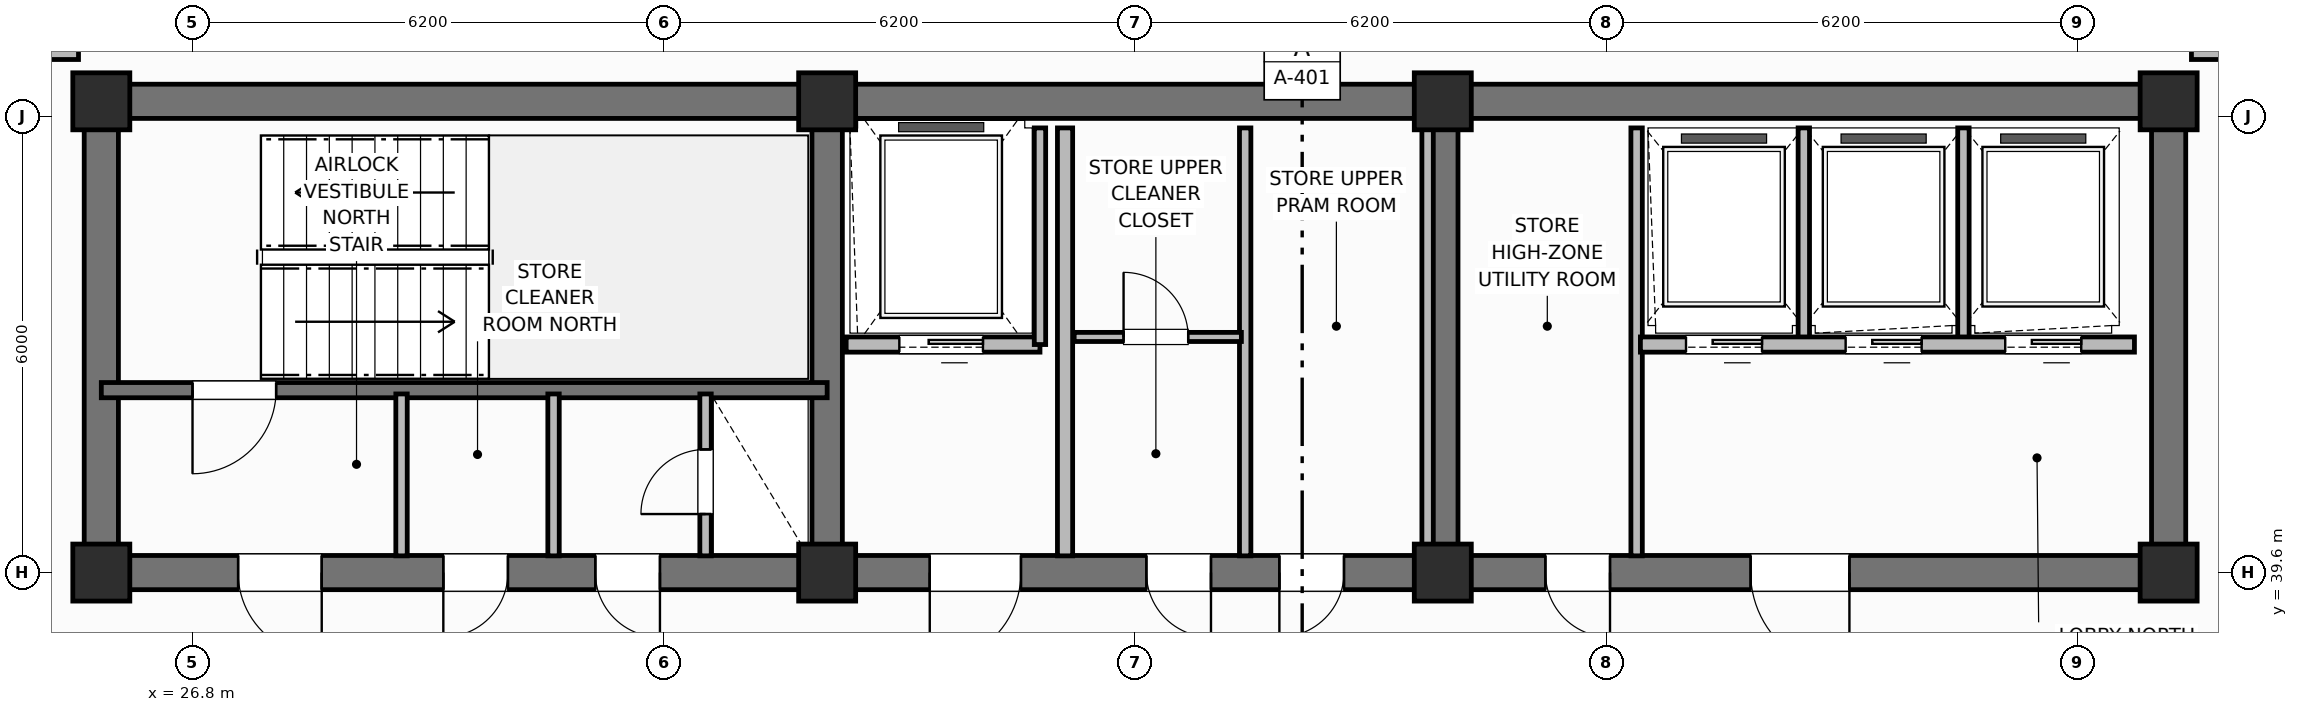
"""IFC4 building model, lengths in metres.
Left out: names, types, materials, properties, quantities, classifications, styles, units other than length and angle.
Written with IfcOpenShell. Run it as: python <this file> out.ifc"""

import sys

from ifc_helpers import new_model, si_unit, direction, frame, frame_2d, origin, origin_2d, place, context, subcontext, project, spatial, rectangle, extrude, element, fill, save


model = new_model("IFC4")
c1 = context("Model", 3, precision=1e-05, world=origin(), true_north=direction((0.0, 1.0)))
c2 = subcontext(c1, "Body", "Model", "MODEL_VIEW")
j1 = project(units=[si_unit("LENGTHUNIT", "METRE"), si_unit("PLANEANGLEUNIT", "RADIAN")], contexts=[c1])
p1 = place(None, origin())
s1 = spatial("IfcSite", under=j1, at=p1, CompositionType="ELEMENT")
p2 = place(p1, origin())
s2 = spatial("IfcBuilding", under=s1, at=p2, CompositionType="ELEMENT")
p3 = place(p2, frame((0.0, 0.0, 267.6)))
s3 = spatial("IfcBuildingStorey", under=s2, at=p3, CompositionType="ELEMENT", Elevation=267.6)
p4 = place(p3, frame((25.6, 45.8, 0.0), z_axis=(0.0, 0.0, 1.0), x_axis=(1.0, 0.0, 0.0)))
e1 = element("IfcWall", 1, at=p4, inside=s3, PredefinedType="SHEAR", context=c2, shape_type="SweptSolid", body=[
    extrude(rectangle(XDim=27.2, YDim=0.45, at=frame_2d((13.6, 0.0))), origin(), (0.0, 0.0, 1.0), 3.7),
])
for number, where, z_axis, x_axis in (
    (2, (25.6, 39.825, 0.0), (0.0, 0.0, 1.0), (0.0, 1.0, 0.0)),
    (3, (52.8, 39.825, 0.0), (0.0, 0.0, 1.0), (0.0, 1.0, 0.0)),
):
    element("IfcWall", number, at=place(p3, frame(where, z_axis=z_axis, x_axis=x_axis)), inside=s3, PredefinedType="SHEAR", context=c2, shape_type="SweptSolid", body=[
        extrude(rectangle(XDim=5.75, YDim=0.45, at=frame_2d((2.875, 0.0))), origin(), (0.0, 0.0, 1.0), 3.7),
    ])
p5 = place(p3, frame((52.8, 39.6, 0.0), z_axis=(0.0, 0.0, 1.0), x_axis=(-1.0, 0.0, 0.0)))
e4 = element("IfcWall", 4, at=p5, inside=s3, PredefinedType="SHEAR", context=c2, shape_type="SweptSolid", body=[
    extrude(rectangle(XDim=27.2, YDim=0.45, at=frame_2d((13.6, 0.0))), origin(), (0.0, 0.0, 1.0), 3.7),
])
p6 = place(p5, frame((24.3, 0.0, 0.0)))
e5 = element("IfcOpeningElement", 5, at=p6, cuts=e4, PredefinedType="OPENING", context=c2, shape_type="SweptSolid", body=[
    extrude(rectangle(XDim=1.1, YDim=2.15, at=frame_2d((0.55, 1.075))), frame((0.0, 0.235, 0.0), z_axis=(0.0, -1.0, 0.0), x_axis=(1.0, 0.0, 0.0)), (0.0, 0.0, 1.0), 0.47),
])
p7 = place(p5, frame((21.85, 0.0, 0.0)))
e6 = element("IfcOpeningElement", 6, at=p7, cuts=e4, PredefinedType="OPENING", context=c2, shape_type="SweptSolid", body=[
    extrude(rectangle(XDim=0.85, YDim=2.1, at=frame_2d((0.425, 1.05))), frame((0.0, 0.235, 0.0), z_axis=(0.0, -1.0, 0.0), x_axis=(1.0, 0.0, 0.0)), (0.0, 0.0, 1.0), 0.47),
])
p8 = place(p5, frame((19.85, 0.0, 0.0)))
e7 = element("IfcOpeningElement", 7, at=p8, cuts=e4, PredefinedType="OPENING", context=c2, shape_type="SweptSolid", body=[
    extrude(rectangle(XDim=0.85, YDim=2.1, at=frame_2d((0.425, 1.05))), frame((0.0, 0.235, 0.0), z_axis=(0.0, -1.0, 0.0), x_axis=(1.0, 0.0, 0.0)), (0.0, 0.0, 1.0), 0.47),
])
p9 = place(p5, frame((15.1, 0.0, 0.0)))
e8 = element("IfcOpeningElement", 8, at=p9, cuts=e4, PredefinedType="OPENING", context=c2, shape_type="SweptSolid", body=[
    extrude(rectangle(XDim=1.2, YDim=2.15, at=frame_2d((0.6, 1.075))), frame((0.0, 0.235, 0.0), z_axis=(0.0, -1.0, 0.0), x_axis=(1.0, 0.0, 0.0)), (0.0, 0.0, 1.0), 0.47),
])
p10 = place(p5, frame((12.6, 0.0, 0.0)))
e9 = element("IfcOpeningElement", 9, at=p10, cuts=e4, PredefinedType="OPENING", context=c2, shape_type="SweptSolid", body=[
    extrude(rectangle(XDim=0.85, YDim=2.1, at=frame_2d((0.425, 1.05))), frame((0.0, 0.235, 0.0), z_axis=(0.0, -1.0, 0.0), x_axis=(1.0, 0.0, 0.0)), (0.0, 0.0, 1.0), 0.47),
])
p11 = place(p5, frame((10.85, 0.0, 0.0)))
e10 = element("IfcOpeningElement", 10, at=p11, cuts=e4, PredefinedType="OPENING", context=c2, shape_type="SweptSolid", body=[
    extrude(rectangle(XDim=0.85, YDim=2.1, at=frame_2d((0.425, 1.05))), frame((0.0, 0.235, 0.0), z_axis=(0.0, -1.0, 0.0), x_axis=(1.0, 0.0, 0.0)), (0.0, 0.0, 1.0), 0.47),
])
p12 = place(p5, frame((7.35, 0.0, 0.0)))
e11 = element("IfcOpeningElement", 11, at=p12, cuts=e4, PredefinedType="OPENING", context=c2, shape_type="SweptSolid", body=[
    extrude(rectangle(XDim=0.85, YDim=2.1, at=frame_2d((0.425, 1.05))), frame((0.0, 0.235, 0.0), z_axis=(0.0, -1.0, 0.0), x_axis=(1.0, 0.0, 0.0)), (0.0, 0.0, 1.0), 0.47),
])
p13 = place(p5, frame((4.2, 0.0, 0.0)))
e12 = element("IfcOpeningElement", 12, at=p13, cuts=e4, PredefinedType="OPENING", context=c2, shape_type="SweptSolid", body=[
    extrude(rectangle(XDim=1.3, YDim=2.2, at=frame_2d((0.65, 1.1))), frame((0.0, 0.235, 0.0), z_axis=(0.0, -1.0, 0.0), x_axis=(1.0, 0.0, 0.0)), (0.0, 0.0, 1.0), 0.47),
])
for number, where, z_axis, x_axis in (
    (13, (35.15, 39.825, 0.0), (0.0, 0.0, 1.0), (0.0, 1.0, 0.0)),
    (14, (43.25, 39.825, 0.0), (0.0, 0.0, 1.0), (0.0, 1.0, 0.0)),
):
    element("IfcWall", number, at=place(p3, frame(where, z_axis=z_axis, x_axis=x_axis)), inside=s3, PredefinedType="SHEAR", context=c2, shape_type="SweptSolid", body=[
        extrude(rectangle(XDim=5.75, YDim=0.4, at=frame_2d((2.875, 0.0))), origin(), (0.0, 0.0, 1.0), 3.7),
    ])
for number, where, z_axis, x_axis in (
    (15, (25.6, 39.6, 0.0), (0.0, 0.0, 1.0), (1.0, 0.0, 0.0)),
    (16, (25.6, 45.8, 0.0), (0.0, 0.0, 1.0), (1.0, 0.0, 0.0)),
    (17, (35.15, 39.6, 0.0), (0.0, 0.0, 1.0), (1.0, 0.0, 0.0)),
    (18, (35.15, 45.8, 0.0), (0.0, 0.0, 1.0), (1.0, 0.0, 0.0)),
    (19, (43.25, 39.6, 0.0), (0.0, 0.0, 1.0), (1.0, 0.0, 0.0)),
    (20, (43.25, 45.8, 0.0), (0.0, 0.0, 1.0), (1.0, 0.0, 0.0)),
    (21, (52.8, 39.6, 0.0), (0.0, 0.0, 1.0), (1.0, 0.0, 0.0)),
    (22, (52.8, 45.8, 0.0), (0.0, 0.0, 1.0), (1.0, 0.0, 0.0)),
):
    element("IfcColumn", number, at=place(p3, frame(where, z_axis=z_axis, x_axis=x_axis)), inside=s3, PredefinedType="COLUMN", context=c2, shape_type="SweptSolid", body=[
        extrude(rectangle(XDim=0.75, YDim=0.75, at=origin_2d()), origin(), (0.0, 0.0, 1.0), 3.7),
    ])
p14 = place(p3, frame((35.15, 42.0, 0.0), z_axis=(0.0, 0.0, 1.0), x_axis=(-1.0, 0.0, 0.0)))
e23 = element("IfcWall", 23, at=p14, inside=s3, PredefinedType="SHEAR", context=c2, shape_type="SweptSolid", body=[
    extrude(rectangle(XDim=9.55, YDim=0.2, at=frame_2d((4.775, 0.0))), origin(), (0.0, 0.0, 1.0), 3.7),
])
p15 = place(p14, frame((7.25, 0.0, 0.0)))
e24 = element("IfcOpeningElement", 24, at=p15, cuts=e23, PredefinedType="OPENING", context=c2, shape_type="SweptSolid", body=[
    extrude(rectangle(XDim=1.1, YDim=2.15, at=frame_2d((0.55, 1.075))), frame((0.0, 0.11, 0.0), z_axis=(0.0, -1.0, 0.0), x_axis=(1.0, 0.0, 0.0)), (0.0, 0.0, 1.0), 0.22),
])
p16 = place(p3, frame((33.55, 39.82, 0.0), z_axis=(0.0, 0.0, 1.0), x_axis=(0.0, 1.0, 0.0)))
e25 = element("IfcWall", 25, at=p16, inside=s3, PredefinedType="PARTITIONING", context=c2, shape_type="SweptSolid", body=[
    extrude(rectangle(XDim=2.13, YDim=0.15, at=frame_2d((1.065, 0.0))), origin(), (0.0, 0.0, 1.0), 2.56),
])
p17 = place(p16, frame((0.55, 0.0, 0.0)))
e26 = element("IfcOpeningElement", 26, at=p17, cuts=e25, PredefinedType="OPENING", context=c2, shape_type="SweptSolid", body=[
    extrude(rectangle(XDim=0.85, YDim=2.05, at=frame_2d((0.425, 1.025))), frame((0.0, 0.085, 0.0), z_axis=(0.0, -1.0, 0.0), x_axis=(1.0, 0.0, 0.0)), (0.0, 0.0, 1.0), 0.17),
])
for number, where, z_axis, x_axis in (
    (27, (29.55, 39.82, 0.0), (0.0, 0.0, 1.0), (0.0, 1.0, 0.0)),
    (28, (31.55, 39.82, 0.0), (0.0, 0.0, 1.0), (0.0, 1.0, 0.0)),
):
    element("IfcWall", number, at=place(p3, frame(where, z_axis=z_axis, x_axis=x_axis)), inside=s3, PredefinedType="PARTITIONING", context=c2, shape_type="SweptSolid", body=[
        extrude(rectangle(XDim=2.13, YDim=0.15, at=frame_2d((1.065, 0.0))), origin(), (0.0, 0.0, 1.0), 2.56),
    ])
p18 = place(p3, frame((37.95, 42.6, 0.0), z_axis=(0.0, 0.0, 1.0), x_axis=(-1.0, 0.0, 0.0)))
e29 = element("IfcWall", 29, at=p18, inside=s3, PredefinedType="PARTITIONING", context=c2, shape_type="SweptSolid", body=[
    extrude(rectangle(XDim=2.55, YDim=0.2, at=frame_2d((1.275, 0.0))), origin(), (0.0, 0.0, 1.0), 2.33),
])
p19 = place(p18, frame((0.75, 0.0, 0.0)))
e30 = element("IfcOpeningElement", 30, at=p19, cuts=e29, PredefinedType="OPENING", context=c2, shape_type="SweptSolid", body=[
    extrude(rectangle(XDim=1.1, YDim=2.15, at=frame_2d((0.55, 1.075))), frame((0.0, 0.11, 0.0), z_axis=(0.0, -1.0, 0.0), x_axis=(1.0, 0.0, 0.0)), (0.0, 0.0, 1.0), 0.22),
])
p20 = place(p3, frame((37.95, 42.6, 0.0), z_axis=(0.0, 0.0, 1.0), x_axis=(0.0, 1.0, 0.0)))
e31 = element("IfcWall", 31, at=p20, inside=s3, PredefinedType="PARTITIONING", context=c2, shape_type="SweptSolid", body=[
    extrude(rectangle(XDim=2.85, YDim=0.15, at=frame_2d((1.425, 0.0))), origin(), (0.0, 0.0, 1.0), 2.56),
])
p21 = place(p3, frame((38.28, 39.82, 0.0), z_axis=(0.0, 0.0, 1.0), x_axis=(0.0, 1.0, 0.0)))
e32 = element("IfcWall", 32, at=p21, inside=s3, PredefinedType="PARTITIONING", context=c2, shape_type="SweptSolid", body=[
    extrude(rectangle(XDim=5.63, YDim=0.2, at=frame_2d((2.815, 0.0))), origin(), (0.0, 0.0, 1.0), 2.56),
])
for number, where, z_axis, x_axis in (
    (33, (43.05, 39.82, 0.0), (0.0, 0.0, 1.0), (0.0, 1.0, 0.0)),
    (34, (40.65, 39.82, 0.0), (0.0, 0.0, 1.0), (0.0, 1.0, 0.0)),
):
    element("IfcWall", number, at=place(p3, frame(where, z_axis=z_axis, x_axis=x_axis)), inside=s3, PredefinedType="PARTITIONING", context=c2, shape_type="SweptSolid", body=[
        extrude(rectangle(XDim=5.63, YDim=0.15, at=frame_2d((2.815, 0.0))), origin(), (0.0, 0.0, 1.0), 2.56),
    ])
p22 = place(p3, frame((38.4, 42.7, 0.0), z_axis=(0.0, 0.0, 1.0), x_axis=(1.0, 0.0, 0.0)))
e35 = element("IfcWall", 35, at=p22, inside=s3, PredefinedType="PARTITIONING", context=c2, shape_type="SweptSolid", body=[
    extrude(rectangle(XDim=2.2, YDim=0.12, at=frame_2d((1.1, 0.0))), origin(), (0.0, 0.0, 1.0), 2.33),
])
p23 = place(p22, frame((0.65, 0.0, 0.0)))
e36 = element("IfcOpeningElement", 36, at=p23, cuts=e35, PredefinedType="OPENING", context=c2, shape_type="SweptSolid", body=[
    extrude(rectangle(XDim=0.85, YDim=2.1, at=frame_2d((0.425, 1.05))), frame((0.0, 0.07, 0.0), z_axis=(0.0, -1.0, 0.0), x_axis=(1.0, 0.0, 0.0)), (0.0, 0.0, 1.0), 0.14),
])
p24 = place(p3, frame((45.8, 39.82, 0.0), z_axis=(0.0, 0.0, 1.0), x_axis=(0.0, 1.0, 0.0)))
e37 = element("IfcWall", 37, at=p24, inside=s3, PredefinedType="PARTITIONING", context=c2, shape_type="SweptSolid", body=[
    extrude(rectangle(XDim=5.63, YDim=0.15, at=frame_2d((2.815, 0.0))), origin(), (0.0, 0.0, 1.0), 2.56),
])
for number, where, z_axis, x_axis in (
    (38, (48.0, 42.65, 0.0), (0.0, 0.0, 1.0), (0.0, 1.0, 0.0)),
    (39, (50.1, 42.65, 0.0), (0.0, 0.0, 1.0), (0.0, 1.0, 0.0)),
):
    element("IfcWall", number, at=place(p3, frame(where, z_axis=z_axis, x_axis=x_axis)), inside=s3, PredefinedType="PARTITIONING", context=c2, shape_type="SweptSolid", body=[
        extrude(rectangle(XDim=2.8, YDim=0.15, at=frame_2d((1.4, 0.0))), origin(), (0.0, 0.0, 1.0), 2.56),
    ])
p25 = place(p3, frame((52.35, 42.6, 0.0), z_axis=(0.0, 0.0, 1.0), x_axis=(-1.0, 0.0, 0.0)))
e40 = element("IfcWall", 40, at=p25, inside=s3, PredefinedType="PARTITIONING", context=c2, shape_type="SweptSolid", body=[
    extrude(rectangle(XDim=6.5, YDim=0.2, at=frame_2d((3.25, 0.0))), origin(), (0.0, 0.0, 1.0), 2.56),
])
p26 = place(p25, frame((4.9, 0.0, 0.0)))
e41 = element("IfcOpeningElement", 41, at=p26, cuts=e40, PredefinedType="OPENING", context=c2, shape_type="SweptSolid", body=[
    extrude(rectangle(XDim=1.0, YDim=2.15, at=frame_2d((0.5, 1.075))), frame((0.0, 0.11, 0.0), z_axis=(0.0, -1.0, 0.0), x_axis=(1.0, 0.0, 0.0)), (0.0, 0.0, 1.0), 0.22),
])
p27 = place(p25, frame((2.8, 0.0, 0.0)))
e42 = element("IfcOpeningElement", 42, at=p27, cuts=e40, PredefinedType="OPENING", context=c2, shape_type="SweptSolid", body=[
    extrude(rectangle(XDim=1.0, YDim=2.15, at=frame_2d((0.5, 1.075))), frame((0.0, 0.11, 0.0), z_axis=(0.0, -1.0, 0.0), x_axis=(1.0, 0.0, 0.0)), (0.0, 0.0, 1.0), 0.22),
])
p28 = place(p25, frame((0.7, 0.0, 0.0)))
e43 = element("IfcOpeningElement", 43, at=p28, cuts=e40, PredefinedType="OPENING", context=c2, shape_type="SweptSolid", body=[
    extrude(rectangle(XDim=1.0, YDim=2.15, at=frame_2d((0.5, 1.075))), frame((0.0, 0.11, 0.0), z_axis=(0.0, -1.0, 0.0), x_axis=(1.0, 0.0, 0.0)), (0.0, 0.0, 1.0), 0.22),
])
p29 = place(p3, frame((21.546, 46.45, 0.0), z_axis=(0.0, 0.0, 1.0), x_axis=(1.0, 0.0, 0.0)))
e44 = element("IfcWall", 44, at=p29, inside=s3, PredefinedType="PARTITIONING", context=c2, shape_type="SweptSolid", body=[
    extrude(rectangle(XDim=3.754, YDim=0.2, at=frame_2d((1.877, 0.0))), origin(), (0.0, 0.0, 1.0), 2.56),
])
p30 = place(p3, frame((53.1, 46.45, 0.0), z_axis=(0.0, 0.0, 1.0), x_axis=(1.0, 0.0, 0.0)))
e45 = element("IfcWall", 45, at=p30, inside=s3, PredefinedType="PARTITIONING", context=c2, shape_type="SweptSolid", body=[
    extrude(rectangle(XDim=3.754, YDim=0.2, at=frame_2d((1.877, 0.0))), origin(), (0.0, 0.0, 1.0), 2.56),
])
p31 = place(p15, origin())
e46 = element("IfcDoor", 46, at=p31, inside=s3, OperationType="SINGLE_SWING_RIGHT", PredefinedType="DOOR", context=c2, shape_type="SweptSolid", body=[
    extrude(rectangle(XDim=1.1, YDim=2.15, at=frame_2d((0.55, 1.075))), frame((0.0, 0.025, 0.0), z_axis=(0.0, -1.0, 0.0), x_axis=(1.0, 0.0, 0.0)), (0.0, 0.0, 1.0), 0.05),
])
fill(e24, e46)
p32 = place(p17, origin())
e47 = element("IfcDoor", 47, at=p32, inside=s3, OperationType="SINGLE_SWING_LEFT", PredefinedType="TRAPDOOR", context=c2, shape_type="SweptSolid", body=[
    extrude(rectangle(XDim=0.85, YDim=2.05, at=frame_2d((0.425, 1.025))), frame((0.0, 0.025, 0.0), z_axis=(0.0, -1.0, 0.0), x_axis=(1.0, 0.0, 0.0)), (0.0, 0.0, 1.0), 0.05),
])
fill(e26, e47)
p33 = place(p19, origin())
e48 = element("IfcDoor", 48, at=p33, inside=s3, OperationType="SLIDING_TO_LEFT", PredefinedType="DOOR", context=c2, shape_type="SweptSolid", body=[
    extrude(rectangle(XDim=1.1, YDim=2.15, at=frame_2d((0.55, 1.075))), frame((0.0, 0.025, 0.0), z_axis=(0.0, -1.0, 0.0), x_axis=(1.0, 0.0, 0.0)), (0.0, 0.0, 1.0), 0.05),
])
fill(e30, e48)
p34 = place(p23, origin())
e49 = element("IfcDoor", 49, at=p34, inside=s3, OperationType="SINGLE_SWING_LEFT", PredefinedType="DOOR", context=c2, shape_type="SweptSolid", body=[
    extrude(rectangle(XDim=0.85, YDim=2.1, at=frame_2d((0.425, 1.05))), frame((0.0, 0.025, 0.0), z_axis=(0.0, -1.0, 0.0), x_axis=(1.0, 0.0, 0.0)), (0.0, 0.0, 1.0), 0.05),
])
fill(e36, e49)
p35 = place(p26, origin())
e50 = element("IfcDoor", 50, at=p35, inside=s3, OperationType="SLIDING_TO_LEFT", PredefinedType="DOOR", context=c2, shape_type="SweptSolid", body=[
    extrude(rectangle(XDim=1.0, YDim=2.15, at=frame_2d((0.5, 1.075))), frame((0.0, 0.025, 0.0), z_axis=(0.0, -1.0, 0.0), x_axis=(1.0, 0.0, 0.0)), (0.0, 0.0, 1.0), 0.05),
])
fill(e41, e50)
p36 = place(p27, origin())
e51 = element("IfcDoor", 51, at=p36, inside=s3, OperationType="SLIDING_TO_LEFT", PredefinedType="DOOR", context=c2, shape_type="SweptSolid", body=[
    extrude(rectangle(XDim=1.0, YDim=2.15, at=frame_2d((0.5, 1.075))), frame((0.0, 0.025, 0.0), z_axis=(0.0, -1.0, 0.0), x_axis=(1.0, 0.0, 0.0)), (0.0, 0.0, 1.0), 0.05),
])
fill(e42, e51)
p37 = place(p28, origin())
e52 = element("IfcDoor", 52, at=p37, inside=s3, OperationType="SLIDING_TO_LEFT", PredefinedType="DOOR", context=c2, shape_type="SweptSolid", body=[
    extrude(rectangle(XDim=1.0, YDim=2.15, at=frame_2d((0.5, 1.075))), frame((0.0, 0.025, 0.0), z_axis=(0.0, -1.0, 0.0), x_axis=(1.0, 0.0, 0.0)), (0.0, 0.0, 1.0), 0.05),
])
fill(e43, e52)
p38 = place(p6, origin())
e53 = element("IfcDoor", 53, at=p38, inside=s3, OperationType="SINGLE_SWING_LEFT", PredefinedType="DOOR", context=c2, shape_type="SweptSolid", body=[
    extrude(rectangle(XDim=1.1, YDim=2.15, at=frame_2d((0.55, 1.075))), frame((0.0, 0.025, 0.0), z_axis=(0.0, -1.0, 0.0), x_axis=(1.0, 0.0, 0.0)), (0.0, 0.0, 1.0), 0.05),
])
fill(e5, e53)
p39 = place(p7, origin())
e54 = element("IfcDoor", 54, at=p39, inside=s3, OperationType="SINGLE_SWING_RIGHT", PredefinedType="DOOR", context=c2, shape_type="SweptSolid", body=[
    extrude(rectangle(XDim=0.85, YDim=2.1, at=frame_2d((0.425, 1.05))), frame((0.0, 0.025, 0.0), z_axis=(0.0, -1.0, 0.0), x_axis=(1.0, 0.0, 0.0)), (0.0, 0.0, 1.0), 0.05),
])
fill(e6, e54)
p40 = place(p8, origin())
e55 = element("IfcDoor", 55, at=p40, inside=s3, OperationType="SINGLE_SWING_LEFT", PredefinedType="DOOR", context=c2, shape_type="SweptSolid", body=[
    extrude(rectangle(XDim=0.85, YDim=2.1, at=frame_2d((0.425, 1.05))), frame((0.0, 0.025, 0.0), z_axis=(0.0, -1.0, 0.0), x_axis=(1.0, 0.0, 0.0)), (0.0, 0.0, 1.0), 0.05),
])
fill(e7, e55)
p41 = place(p9, origin())
e56 = element("IfcDoor", 56, at=p41, inside=s3, OperationType="SINGLE_SWING_RIGHT", PredefinedType="DOOR", context=c2, shape_type="SweptSolid", body=[
    extrude(rectangle(XDim=1.2, YDim=2.15, at=frame_2d((0.6, 1.075))), frame((0.0, 0.025, 0.0), z_axis=(0.0, -1.0, 0.0), x_axis=(1.0, 0.0, 0.0)), (0.0, 0.0, 1.0), 0.05),
])
fill(e8, e56)
p42 = place(p10, origin())
e57 = element("IfcDoor", 57, at=p42, inside=s3, OperationType="SINGLE_SWING_LEFT", PredefinedType="DOOR", context=c2, shape_type="SweptSolid", body=[
    extrude(rectangle(XDim=0.85, YDim=2.1, at=frame_2d((0.425, 1.05))), frame((0.0, 0.025, 0.0), z_axis=(0.0, -1.0, 0.0), x_axis=(1.0, 0.0, 0.0)), (0.0, 0.0, 1.0), 0.05),
])
fill(e9, e57)
p43 = place(p11, origin())
e58 = element("IfcDoor", 58, at=p43, inside=s3, OperationType="SINGLE_SWING_RIGHT", PredefinedType="DOOR", context=c2, shape_type="SweptSolid", body=[
    extrude(rectangle(XDim=0.85, YDim=2.1, at=frame_2d((0.425, 1.05))), frame((0.0, 0.025, 0.0), z_axis=(0.0, -1.0, 0.0), x_axis=(1.0, 0.0, 0.0)), (0.0, 0.0, 1.0), 0.05),
])
fill(e10, e58)
p44 = place(p12, origin())
e59 = element("IfcDoor", 59, at=p44, inside=s3, OperationType="SINGLE_SWING_LEFT", PredefinedType="DOOR", context=c2, shape_type="SweptSolid", body=[
    extrude(rectangle(XDim=0.85, YDim=2.1, at=frame_2d((0.425, 1.05))), frame((0.0, 0.025, 0.0), z_axis=(0.0, -1.0, 0.0), x_axis=(1.0, 0.0, 0.0)), (0.0, 0.0, 1.0), 0.05),
])
fill(e11, e59)
p45 = place(p13, origin())
e60 = element("IfcDoor", 60, at=p45, inside=s3, OperationType="SINGLE_SWING_LEFT", PredefinedType="DOOR", context=c2, shape_type="SweptSolid", body=[
    extrude(rectangle(XDim=1.3, YDim=2.2, at=frame_2d((0.65, 1.1))), frame((0.0, 0.025, 0.0), z_axis=(0.0, -1.0, 0.0), x_axis=(1.0, 0.0, 0.0)), (0.0, 0.0, 1.0), 0.05),
])
fill(e12, e60)
save(model, sys.argv[1])
